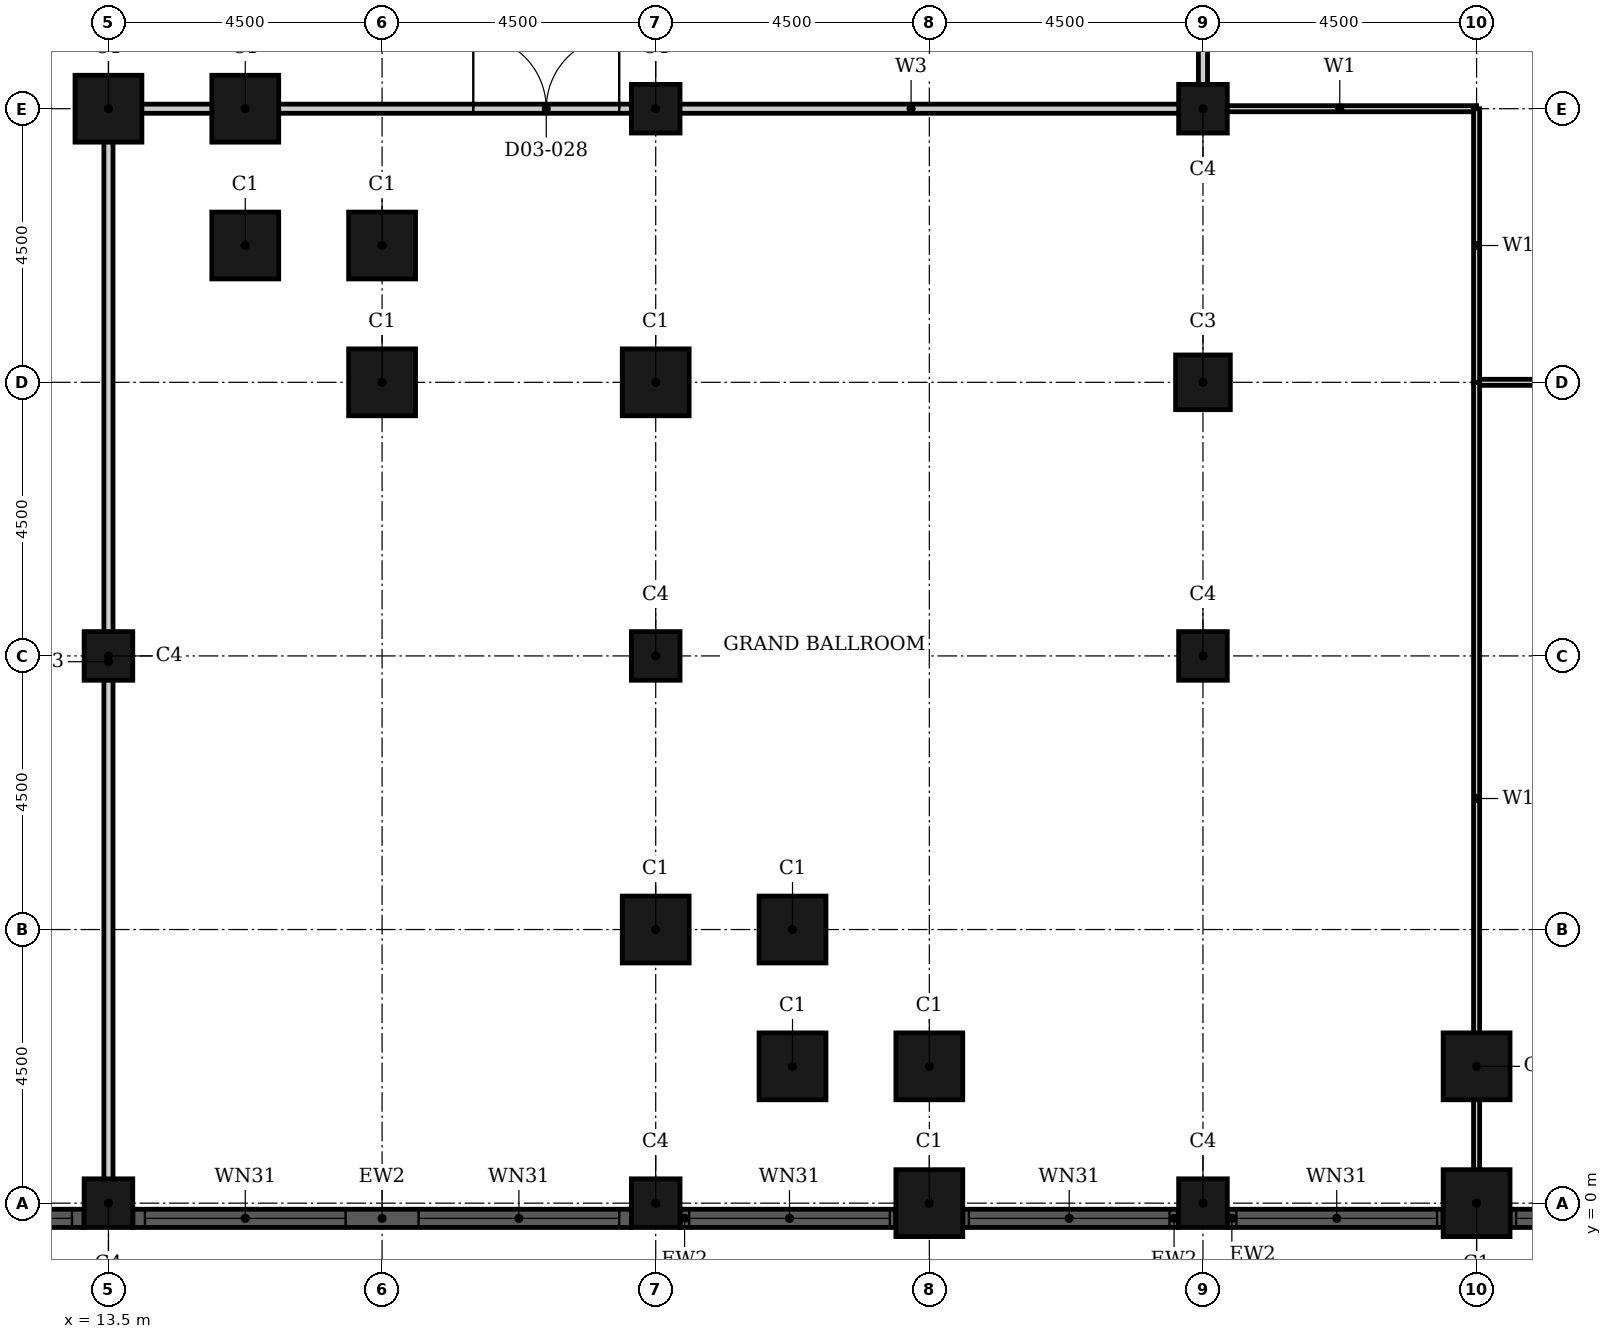
"""IFC4 building model, lengths in metres.
Left out: names, types, materials, properties, quantities, classifications, styles, units other than length and angle.
Written with IfcOpenShell. Run it as: python <this file> out.ifc"""

import sys

from ifc_helpers import new_model, si_unit, direction, frame, frame_2d, origin, origin_2d, place, context, subcontext, project, spatial, rectangle, hollow_rectangle, extrude, element, fill, save


model = new_model("IFC4")
c1 = context("Model", 3, precision=1e-05, world=origin(), true_north=direction((0.0, 1.0)))
c2 = subcontext(c1, "Body", "Model", "MODEL_VIEW")
j1 = project(units=[si_unit("LENGTHUNIT", "METRE"), si_unit("PLANEANGLEUNIT", "RADIAN")], contexts=[c1])
p1 = place(None, origin())
s1 = spatial("IfcSite", under=j1, at=p1, CompositionType="ELEMENT")
p2 = place(p1, origin())
s2 = spatial("IfcBuilding", under=s1, at=p2, CompositionType="ELEMENT")
p3 = place(p2, frame((0.0, 0.0, 17.4)))
s3 = spatial("IfcBuildingStorey", under=s2, at=p3, CompositionType="ELEMENT", Elevation=17.4)
for number, where, z_axis, x_axis in (
    (1, (22.5, 4.5, 0.0), (0.0, 0.0, 1.0), (1.0, 0.0, 0.0)),
    (2, (24.75, 4.5, 0.0), (0.0, 0.0, 1.0), (1.0, 0.0, 0.0)),
    (3, (24.75, 2.25, 0.0), (0.0, 0.0, 1.0), (1.0, 0.0, 0.0)),
    (4, (27.0, 2.25, 0.0), (0.0, 0.0, 1.0), (1.0, 0.0, 0.0)),
    (5, (27.0, 0.0, 0.0), (0.0, 0.0, 1.0), (1.0, 0.0, 0.0)),
    (6, (36.0, 0.0, 0.0), (0.0, 0.0, 1.0), (1.0, 0.0, 0.0)),
    (7, (36.0, 2.25, 0.0), (0.0, 0.0, 1.0), (1.0, 0.0, 0.0)),
    (8, (13.5, 18.0, 0.0), (0.0, 0.0, 1.0), (1.0, 0.0, 0.0)),
    (9, (15.75, 18.0, 0.0), (0.0, 0.0, 1.0), (1.0, 0.0, 0.0)),
    (10, (15.75, 15.75, 0.0), (0.0, 0.0, 1.0), (1.0, 0.0, 0.0)),
    (11, (18.0, 15.75, 0.0), (0.0, 0.0, 1.0), (1.0, 0.0, 0.0)),
    (12, (18.0, 13.5, 0.0), (0.0, 0.0, 1.0), (1.0, 0.0, 0.0)),
    (13, (22.5, 13.5, 0.0), (0.0, 0.0, 1.0), (1.0, 0.0, 0.0)),
):
    element("IfcColumn", number, at=place(p3, frame(where, z_axis=z_axis, x_axis=x_axis)), inside=s3, PredefinedType="COLUMN", context=c2, shape_type="SweptSolid", body=[
        extrude(hollow_rectangle(XDim=1.1, YDim=1.1, WallThickness=0.036, at=origin_2d()), origin(), (0.0, 0.0, 1.0), 6.6),
    ])
p4 = place(p3, frame((31.5, 13.5, 0.0), z_axis=(0.0, 0.0, 1.0), x_axis=(1.0, 0.0, 0.0)))
e14 = element("IfcColumn", 14, at=p4, inside=s3, PredefinedType="COLUMN", context=c2, shape_type="SweptSolid", body=[
    extrude(hollow_rectangle(XDim=0.9, YDim=0.9, WallThickness=0.028, at=origin_2d()), origin(), (0.0, 0.0, 1.0), 6.6),
])
for number, where, z_axis, x_axis in (
    (15, (13.5, 0.0, 0.0), (0.0, 0.0, 1.0), (1.0, 0.0, 0.0)),
    (16, (22.5, 0.0, 0.0), (0.0, 0.0, 1.0), (1.0, 0.0, 0.0)),
    (17, (31.5, 0.0, 0.0), (0.0, 0.0, 1.0), (1.0, 0.0, 0.0)),
    (18, (13.5, 9.0, 0.0), (0.0, 0.0, 1.0), (1.0, 0.0, 0.0)),
    (19, (22.5, 9.0, 0.0), (0.0, 0.0, 1.0), (1.0, 0.0, 0.0)),
    (20, (22.5, 18.0, 0.0), (0.0, 0.0, 1.0), (1.0, 0.0, 0.0)),
    (21, (31.5, 9.0, 0.0), (0.0, 0.0, 1.0), (1.0, 0.0, 0.0)),
    (22, (31.5, 18.0, 0.0), (0.0, 0.0, 1.0), (1.0, 0.0, 0.0)),
):
    element("IfcColumn", number, at=place(p3, frame(where, z_axis=z_axis, x_axis=x_axis)), inside=s3, PredefinedType="COLUMN", context=c2, shape_type="SweptSolid", body=[
        extrude(hollow_rectangle(XDim=0.8, YDim=0.8, WallThickness=0.025, at=origin_2d()), origin(), (0.0, 0.0, 1.0), 6.6),
    ])
p5 = place(p3, frame((4.9, -0.25, 0.0), z_axis=(0.0, 0.0, 1.0), x_axis=(1.0, 0.0, 0.0)))
e23 = element("IfcWall", 23, at=p5, inside=s3, PredefinedType="SOLIDWALL", context=c2, shape_type="SweptSolid", body=[
    extrude(rectangle(XDim=8.2, YDim=0.3, at=frame_2d((4.1, 0.0))), origin(), (0.0, 0.0, 1.0), 6.6),
])
p6 = place(p5, frame((0.2, 0.0, 0.9)))
e24 = element("IfcOpeningElement", 24, at=p6, cuts=e23, PredefinedType="OPENING", context=c2, shape_type="SweptSolid", body=[
    extrude(rectangle(XDim=3.3, YDim=3.6, at=frame_2d((1.65, 1.8))), frame((0.0, 0.16, 0.0), z_axis=(0.0, -1.0, 0.0), x_axis=(1.0, 0.0, 0.0)), (0.0, 0.0, 1.0), 0.32),
])
p7 = place(p5, frame((4.7, 0.0, 0.9)))
e25 = element("IfcOpeningElement", 25, at=p7, cuts=e23, PredefinedType="OPENING", context=c2, shape_type="SweptSolid", body=[
    extrude(rectangle(XDim=3.3, YDim=3.6, at=frame_2d((1.65, 1.8))), frame((0.0, 0.16, 0.0), z_axis=(0.0, -1.0, 0.0), x_axis=(1.0, 0.0, 0.0)), (0.0, 0.0, 1.0), 0.32),
])
p8 = place(p3, frame((13.9, -0.25, 0.0), z_axis=(0.0, 0.0, 1.0), x_axis=(1.0, 0.0, 0.0)))
e26 = element("IfcWall", 26, at=p8, inside=s3, PredefinedType="SOLIDWALL", context=c2, shape_type="SweptSolid", body=[
    extrude(rectangle(XDim=8.2, YDim=0.3, at=frame_2d((4.1, 0.0))), origin(), (0.0, 0.0, 1.0), 6.6),
])
p9 = place(p8, frame((0.2, 0.0, 0.9)))
e27 = element("IfcOpeningElement", 27, at=p9, cuts=e26, PredefinedType="OPENING", context=c2, shape_type="SweptSolid", body=[
    extrude(rectangle(XDim=3.3, YDim=3.6, at=frame_2d((1.65, 1.8))), frame((0.0, 0.16, 0.0), z_axis=(0.0, -1.0, 0.0), x_axis=(1.0, 0.0, 0.0)), (0.0, 0.0, 1.0), 0.32),
])
p10 = place(p8, frame((4.7, 0.0, 0.9)))
e28 = element("IfcOpeningElement", 28, at=p10, cuts=e26, PredefinedType="OPENING", context=c2, shape_type="SweptSolid", body=[
    extrude(rectangle(XDim=3.3, YDim=3.6, at=frame_2d((1.65, 1.8))), frame((0.0, 0.16, 0.0), z_axis=(0.0, -1.0, 0.0), x_axis=(1.0, 0.0, 0.0)), (0.0, 0.0, 1.0), 0.32),
])
p11 = place(p3, frame((22.9, -0.25, 0.0), z_axis=(0.0, 0.0, 1.0), x_axis=(1.0, 0.0, 0.0)))
e29 = element("IfcWall", 29, at=p11, inside=s3, PredefinedType="SOLIDWALL", context=c2, shape_type="SweptSolid", body=[
    extrude(rectangle(XDim=3.55, YDim=0.3, at=frame_2d((1.775, 0.0))), origin(), (0.0, 0.0, 1.0), 6.6),
])
p12 = place(p11, frame((0.15, 0.0, 0.9)))
e30 = element("IfcOpeningElement", 30, at=p12, cuts=e29, PredefinedType="OPENING", context=c2, shape_type="SweptSolid", body=[
    extrude(rectangle(XDim=3.3, YDim=3.6, at=frame_2d((1.65, 1.8))), frame((0.0, 0.16, 0.0), z_axis=(0.0, -1.0, 0.0), x_axis=(1.0, 0.0, 0.0)), (0.0, 0.0, 1.0), 0.32),
])
p13 = place(p3, frame((27.55, -0.25, 0.0), z_axis=(0.0, 0.0, 1.0), x_axis=(1.0, 0.0, 0.0)))
e31 = element("IfcWall", 31, at=p13, inside=s3, PredefinedType="SOLIDWALL", context=c2, shape_type="SweptSolid", body=[
    extrude(rectangle(XDim=3.55, YDim=0.3, at=frame_2d((1.775, 0.0))), origin(), (0.0, 0.0, 1.0), 6.6),
])
p14 = place(p13, frame((0.1, 0.0, 0.9)))
e32 = element("IfcOpeningElement", 32, at=p14, cuts=e31, PredefinedType="OPENING", context=c2, shape_type="SweptSolid", body=[
    extrude(rectangle(XDim=3.3, YDim=3.6, at=frame_2d((1.65, 1.8))), frame((0.0, 0.16, 0.0), z_axis=(0.0, -1.0, 0.0), x_axis=(1.0, 0.0, 0.0)), (0.0, 0.0, 1.0), 0.32),
])
p15 = place(p3, frame((31.9, -0.25, 0.0), z_axis=(0.0, 0.0, 1.0), x_axis=(1.0, 0.0, 0.0)))
e33 = element("IfcWall", 33, at=p15, inside=s3, PredefinedType="SOLIDWALL", context=c2, shape_type="SweptSolid", body=[
    extrude(rectangle(XDim=3.55, YDim=0.3, at=frame_2d((1.775, 0.0))), origin(), (0.0, 0.0, 1.0), 6.6),
])
p16 = place(p15, frame((0.15, 0.0, 0.9)))
e34 = element("IfcOpeningElement", 34, at=p16, cuts=e33, PredefinedType="OPENING", context=c2, shape_type="SweptSolid", body=[
    extrude(rectangle(XDim=3.3, YDim=3.6, at=frame_2d((1.65, 1.8))), frame((0.0, 0.16, 0.0), z_axis=(0.0, -1.0, 0.0), x_axis=(1.0, 0.0, 0.0)), (0.0, 0.0, 1.0), 0.32),
])
p17 = place(p3, frame((36.55, -0.25, 0.0), z_axis=(0.0, 0.0, 1.0), x_axis=(1.0, 0.0, 0.0)))
e35 = element("IfcWall", 35, at=p17, inside=s3, PredefinedType="SOLIDWALL", context=c2, shape_type="SweptSolid", body=[
    extrude(rectangle(XDim=3.55, YDim=0.3, at=frame_2d((1.775, 0.0))), origin(), (0.0, 0.0, 1.0), 6.6),
])
p18 = place(p17, frame((0.1, 0.0, 0.9)))
e36 = element("IfcOpeningElement", 36, at=p18, cuts=e35, PredefinedType="OPENING", context=c2, shape_type="SweptSolid", body=[
    extrude(rectangle(XDim=3.3, YDim=3.6, at=frame_2d((1.65, 1.8))), frame((0.0, 0.16, 0.0), z_axis=(0.0, -1.0, 0.0), x_axis=(1.0, 0.0, 0.0)), (0.0, 0.0, 1.0), 0.32),
])
p19 = place(p3, frame((13.5, 18.0, 0.0), z_axis=(0.0, 0.0, 1.0), x_axis=(1.0, 0.0, 0.0)))
e37 = element("IfcWall", 37, at=p19, inside=s3, PredefinedType="PARTITIONING", context=c2, shape_type="SweptSolid", body=[
    extrude(rectangle(XDim=18.0, YDim=0.15, at=frame_2d((9.0, 0.0))), origin(), (0.0, 0.0, 1.0), 6.25),
])
p20 = place(p19, frame((6.0, 0.0, 0.0)))
e38 = element("IfcOpeningElement", 38, at=p20, cuts=e37, PredefinedType="OPENING", context=c2, shape_type="SweptSolid", body=[
    extrude(rectangle(XDim=2.4, YDim=2.4, at=frame_2d((1.2, 1.2))), frame((0.0, 0.085, 0.0), z_axis=(0.0, -1.0, 0.0), x_axis=(1.0, 0.0, 0.0)), (0.0, 0.0, 1.0), 0.17),
])
p21 = place(p3, frame((13.5, -0.19, 0.0), z_axis=(0.0, 0.0, 1.0), x_axis=(0.0, 1.0, 0.0)))
e39 = element("IfcWall", 39, at=p21, inside=s3, PredefinedType="PARTITIONING", context=c2, shape_type="SweptSolid", body=[
    extrude(rectangle(XDim=18.19, YDim=0.15, at=frame_2d((9.095, 0.0))), origin(), (0.0, 0.0, 1.0), 6.25),
])
p22 = place(p3, frame((31.5, 18.0, 0.0), z_axis=(0.0, 0.0, 1.0), x_axis=(0.0, 1.0, 0.0)))
e40 = element("IfcWall", 40, at=p22, inside=s3, PredefinedType="PARTITIONING", context=c2, shape_type="SweptSolid", body=[
    extrude(rectangle(XDim=4.5, YDim=0.15, at=frame_2d((2.25, 0.0))), origin(), (0.0, 0.0, 1.0), 6.25),
])
for number, where, z_axis, x_axis in (
    (41, (36.0, 13.5, 0.0), (0.0, 0.0, 1.0), (1.0, 0.0, 0.0)),
    (42, (31.5, 18.0, 0.0), (0.0, 0.0, 1.0), (1.0, 0.0, 0.0)),
):
    element("IfcWall", number, at=place(p3, frame(where, z_axis=z_axis, x_axis=x_axis)), inside=s3, PredefinedType="PARTITIONING", context=c2, shape_type="SweptSolid", body=[
        extrude(rectangle(XDim=4.5, YDim=0.1, at=frame_2d((2.25, 0.0))), origin(), (0.0, 0.0, 1.0), 6.25),
    ])
p23 = place(p3, frame((36.0, -0.19, 0.0), z_axis=(0.0, 0.0, 1.0), x_axis=(0.0, 1.0, 0.0)))
e43 = element("IfcWall", 43, at=p23, inside=s3, PredefinedType="PARTITIONING", context=c2, shape_type="SweptSolid", body=[
    extrude(rectangle(XDim=13.69, YDim=0.1, at=frame_2d((6.845, 0.0))), origin(), (0.0, 0.0, 1.0), 6.25),
])
p24 = place(p3, frame((36.0, 13.5, 0.0), z_axis=(0.0, 0.0, 1.0), x_axis=(0.0, 1.0, 0.0)))
e44 = element("IfcWall", 44, at=p24, inside=s3, PredefinedType="PARTITIONING", context=c2, shape_type="SweptSolid", body=[
    extrude(rectangle(XDim=4.5, YDim=0.1, at=frame_2d((2.25, 0.0))), origin(), (0.0, 0.0, 1.0), 6.25),
])
p25 = place(p7, origin())
e45 = element("IfcWindow", 45, at=p25, inside=s3, PartitioningType="SINGLE_PANEL", PredefinedType="WINDOW", context=c2, shape_type="SweptSolid", body=[
    extrude(rectangle(XDim=3.3, YDim=3.6, at=frame_2d((1.65, 1.8))), frame((0.0, 0.03, 0.0), z_axis=(0.0, -1.0, 0.0), x_axis=(1.0, 0.0, 0.0)), (0.0, 0.0, 1.0), 0.06),
])
fill(e25, e45)
p26 = place(p9, origin())
e46 = element("IfcWindow", 46, at=p26, inside=s3, PartitioningType="SINGLE_PANEL", PredefinedType="WINDOW", context=c2, shape_type="SweptSolid", body=[
    extrude(rectangle(XDim=3.3, YDim=3.6, at=frame_2d((1.65, 1.8))), frame((0.0, 0.03, 0.0), z_axis=(0.0, -1.0, 0.0), x_axis=(1.0, 0.0, 0.0)), (0.0, 0.0, 1.0), 0.06),
])
fill(e27, e46)
p27 = place(p10, origin())
e47 = element("IfcWindow", 47, at=p27, inside=s3, PartitioningType="SINGLE_PANEL", PredefinedType="WINDOW", context=c2, shape_type="SweptSolid", body=[
    extrude(rectangle(XDim=3.3, YDim=3.6, at=frame_2d((1.65, 1.8))), frame((0.0, 0.03, 0.0), z_axis=(0.0, -1.0, 0.0), x_axis=(1.0, 0.0, 0.0)), (0.0, 0.0, 1.0), 0.06),
])
fill(e28, e47)
p28 = place(p12, origin())
e48 = element("IfcWindow", 48, at=p28, inside=s3, PartitioningType="SINGLE_PANEL", PredefinedType="WINDOW", context=c2, shape_type="SweptSolid", body=[
    extrude(rectangle(XDim=3.3, YDim=3.6, at=frame_2d((1.65, 1.8))), frame((0.0, 0.03, 0.0), z_axis=(0.0, -1.0, 0.0), x_axis=(1.0, 0.0, 0.0)), (0.0, 0.0, 1.0), 0.06),
])
fill(e30, e48)
p29 = place(p14, origin())
e49 = element("IfcWindow", 49, at=p29, inside=s3, PartitioningType="SINGLE_PANEL", PredefinedType="WINDOW", context=c2, shape_type="SweptSolid", body=[
    extrude(rectangle(XDim=3.3, YDim=3.6, at=frame_2d((1.65, 1.8))), frame((0.0, 0.03, 0.0), z_axis=(0.0, -1.0, 0.0), x_axis=(1.0, 0.0, 0.0)), (0.0, 0.0, 1.0), 0.06),
])
fill(e32, e49)
p30 = place(p16, origin())
e50 = element("IfcWindow", 50, at=p30, inside=s3, PartitioningType="SINGLE_PANEL", PredefinedType="WINDOW", context=c2, shape_type="SweptSolid", body=[
    extrude(rectangle(XDim=3.3, YDim=3.6, at=frame_2d((1.65, 1.8))), frame((0.0, 0.03, 0.0), z_axis=(0.0, -1.0, 0.0), x_axis=(1.0, 0.0, 0.0)), (0.0, 0.0, 1.0), 0.06),
])
fill(e34, e50)
p31 = place(p18, origin())
e51 = element("IfcWindow", 51, at=p31, inside=s3, PartitioningType="SINGLE_PANEL", PredefinedType="WINDOW", context=c2, shape_type="SweptSolid", body=[
    extrude(rectangle(XDim=3.3, YDim=3.6, at=frame_2d((1.65, 1.8))), frame((0.0, 0.03, 0.0), z_axis=(0.0, -1.0, 0.0), x_axis=(1.0, 0.0, 0.0)), (0.0, 0.0, 1.0), 0.06),
])
fill(e36, e51)
p32 = place(p20, origin())
e52 = element("IfcDoor", 52, at=p32, inside=s3, OperationType="DOUBLE_DOOR_SINGLE_SWING", PredefinedType="DOOR", context=c2, shape_type="SweptSolid", body=[
    extrude(rectangle(XDim=2.4, YDim=2.4, at=frame_2d((1.2, 1.2))), frame((0.0, 0.025, 0.0), z_axis=(0.0, -1.0, 0.0), x_axis=(1.0, 0.0, 0.0)), (0.0, 0.0, 1.0), 0.05),
])
fill(e38, e52)
save(model, sys.argv[1])
